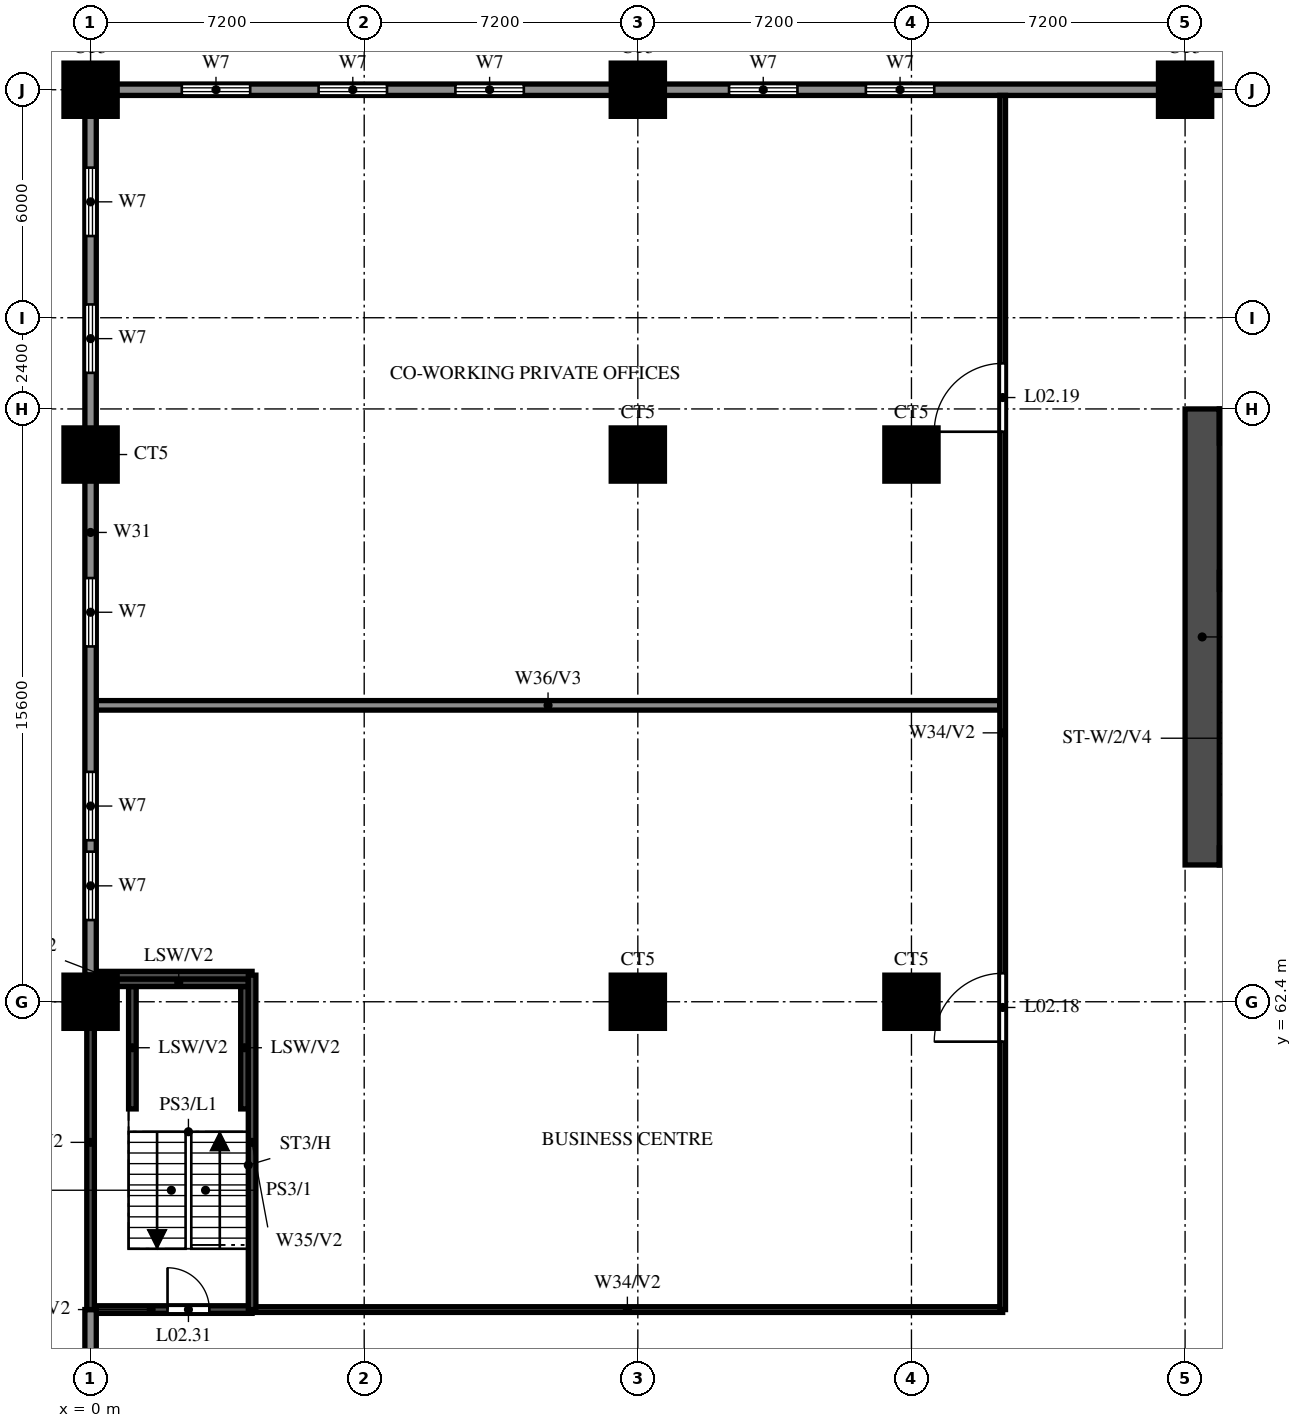
"""IFC4 building model, lengths in metres.
Left out: names, types, materials, properties, quantities, classifications, styles, units other than length and angle.
Written with IfcOpenShell. Run it as: python <this file> out.ifc"""

import sys

from ifc_helpers import new_model, si_unit, direction, frame, frame_2d, origin, origin_2d, place, context, subcontext, project, spatial, rectangle, circle, extrude, source, transform, mapped, element, fill, save


model = new_model("IFC4")
c1 = context("Model", 3, precision=1e-05, world=origin(), true_north=direction((0.0, 1.0)))
c2 = subcontext(c1, "Body", "Model", "MODEL_VIEW")
j1 = project(units=[si_unit("LENGTHUNIT", "METRE"), si_unit("PLANEANGLEUNIT", "RADIAN")], contexts=[c1])
p1 = place(None, origin())
s1 = spatial("IfcSite", under=j1, at=p1, CompositionType="ELEMENT")
p2 = place(p1, origin())
s2 = spatial("IfcBuilding", under=s1, at=p2, CompositionType="ELEMENT")
p3 = place(p2, frame((0.0, 0.0, 13.2)))
s3 = spatial("IfcBuildingStorey", under=s2, at=p3, CompositionType="ELEMENT", Elevation=13.2)
m1 = source(origin(), c2, "Body", "SweptSolid", [
    extrude(circle(Radius=0.7, at=origin_2d()), origin(), (0.0, 0.0, 1.0), 3.8),
])
for number, where, z_axis, x_axis in (
    (1, (0.0, 62.4, 0.0), (0.0, 0.0, 1.0), (1.0, 0.0, 0.0)),
    (2, (14.4, 62.4, 0.0), (0.0, 0.0, 1.0), (1.0, 0.0, 0.0)),
    (3, (21.6, 62.4, 0.0), (0.0, 0.0, 1.0), (1.0, 0.0, 0.0)),
    (4, (0.0, 76.8, 0.0), (0.0, 0.0, 1.0), (1.0, 0.0, 0.0)),
    (5, (14.4, 76.8, 0.0), (0.0, 0.0, 1.0), (1.0, 0.0, 0.0)),
    (6, (21.6, 76.8, 0.0), (0.0, 0.0, 1.0), (1.0, 0.0, 0.0)),
    (7, (0.0, 86.4, 0.0), (0.0, 0.0, 1.0), (1.0, 0.0, 0.0)),
    (8, (14.4, 86.4, 0.0), (0.0, 0.0, 1.0), (1.0, 0.0, 0.0)),
    (9, (28.8, 86.4, 0.0), (0.0, 0.0, 1.0), (1.0, 0.0, 0.0)),
):
    element("IfcColumn", number, at=place(p3, frame(where, z_axis=z_axis, x_axis=x_axis)), inside=s3, PredefinedType="COLUMN", context=c2, shape_type="MappedRepresentation", body=[
        mapped(m1, transform((0.0, 0.0, 0.0))),
    ])
p4 = place(p3, frame((29.25, 66.0, 0.0), z_axis=(0.0, 0.0, 1.0), x_axis=(0.0, 1.0, 0.0)))
e10 = element("IfcWall", 10, at=p4, inside=s3, PredefinedType="SHEAR", context=c2, shape_type="SweptSolid", body=[
    extrude(rectangle(XDim=12.0, YDim=0.9, at=frame_2d((6.0, 0.0))), origin(), (0.0, 0.0, 1.0), 3.8),
])
p5 = place(p3, frame((29.7, 77.55, 0.0), z_axis=(0.0, 0.0, 1.0), x_axis=(1.0, 0.0, 0.0)))
e11 = element("IfcWall", 11, at=p5, inside=s3, PredefinedType="SHEAR", context=c2, shape_type="SweptSolid", body=[
    extrude(rectangle(XDim=41.4, YDim=0.9, at=frame_2d((20.7, 0.0))), origin(), (0.0, 0.0, 1.0), 3.8),
])
p6 = place(p3, frame((29.7, 66.225, 0.0), z_axis=(0.0, 0.0, 1.0), x_axis=(1.0, 0.0, 0.0)))
e12 = element("IfcWall", 12, at=p6, inside=s3, PredefinedType="SHEAR", context=c2, shape_type="SweptSolid", body=[
    extrude(rectangle(XDim=41.4, YDim=0.45, at=frame_2d((20.7, 0.0))), origin(), (0.0, 0.0, 1.0), 3.8),
])
p7 = place(p6, frame((0.925, 0.0, 0.0)))
e13 = element("IfcOpeningElement", 13, at=p7, cuts=e12, PredefinedType="OPENING", context=c2, shape_type="SweptSolid", body=[
    extrude(rectangle(XDim=1.1, YDim=2.1, at=frame_2d((0.55, 1.05))), frame((0.0, 0.235, 0.0), z_axis=(0.0, -1.0, 0.0), x_axis=(1.0, 0.0, 0.0)), (0.0, 0.0, 1.0), 0.47),
])
p8 = place(p6, frame((3.738, 0.0, 0.0)))
e14 = element("IfcOpeningElement", 14, at=p8, cuts=e12, PredefinedType="OPENING", context=c2, shape_type="SweptSolid", body=[
    extrude(rectangle(XDim=1.8, YDim=2.1, at=frame_2d((0.9, 1.05))), frame((0.0, 0.235, 0.0), z_axis=(0.0, -1.0, 0.0), x_axis=(1.0, 0.0, 0.0)), (0.0, 0.0, 1.0), 0.47),
])
p9 = place(p3, frame((29.7, 73.475, 0.0), z_axis=(0.0, 0.0, 1.0), x_axis=(1.0, 0.0, 0.0)))
e15 = element("IfcWall", 15, at=p9, inside=s3, PredefinedType="SHEAR", context=c2, shape_type="SweptSolid", body=[
    extrude(rectangle(XDim=3.175, YDim=0.45, at=frame_2d((1.587, 0.0))), origin(), (0.0, 0.0, 1.0), 3.8),
])
for number, where, z_axis, x_axis in (
    (16, (1.1, 59.58, 0.0), (0.0, 0.0, 1.0), (0.0, 1.0, 0.0)),
    (17, (4.05, 59.58, 0.0), (0.0, 0.0, 1.0), (0.0, 1.0, 0.0)),
):
    element("IfcWall", number, at=place(p3, frame(where, z_axis=z_axis, x_axis=x_axis)), inside=s3, PredefinedType="SOLIDWALL", context=c2, shape_type="SweptSolid", body=[
        extrude(rectangle(XDim=3.22, YDim=0.2, at=frame_2d((1.61, 0.0))), origin(), (0.0, 0.0, 1.0), 1.9),
    ])
p10 = place(p3, frame((0.49, 62.9, 0.0), z_axis=(0.0, 0.0, 1.0), x_axis=(1.0, 0.0, 0.0)))
e18 = element("IfcWall", 18, at=p10, inside=s3, PredefinedType="SOLIDWALL", context=c2, shape_type="SweptSolid", body=[
    extrude(rectangle(XDim=3.66, YDim=0.2, at=frame_2d((1.83, 0.0))), origin(), (0.0, 0.0, 1.0), 1.9),
])
p11 = place(p3, frame((4.25, 54.3, 0.0), z_axis=(0.0, 0.0, 1.0), x_axis=(1.0, 0.0, 0.0)))
e19 = element("IfcWall", 19, at=p11, inside=s3, PredefinedType="PARTITIONING", context=c2, shape_type="SweptSolid", body=[
    extrude(rectangle(XDim=19.75, YDim=0.15, at=frame_2d((9.875, 0.0))), origin(), (0.0, 0.0, 1.0), 2.6),
])
p12 = place(p3, frame((0.0, 54.3, 0.0), z_axis=(0.0, 0.0, 1.0), x_axis=(1.0, 0.0, 0.0)))
e20 = element("IfcWall", 20, at=p12, inside=s3, PredefinedType="SOLIDWALL", context=c2, shape_type="SweptSolid", body=[
    extrude(rectangle(XDim=4.25, YDim=0.2, at=frame_2d((2.125, 0.0))), origin(), (0.0, 0.0, 1.0), 3.8),
])
p13 = place(p12, frame((2.025, 0.0, 0.0)))
e21 = element("IfcOpeningElement", 21, at=p13, cuts=e20, PredefinedType="OPENING", context=c2, shape_type="SweptSolid", body=[
    extrude(rectangle(XDim=1.1, YDim=2.1, at=frame_2d((0.55, 1.05))), frame((0.0, 0.11, 0.0), z_axis=(0.0, -1.0, 0.0), x_axis=(1.0, 0.0, 0.0)), (0.0, 0.0, 1.0), 0.22),
])
p14 = place(p3, frame((0.0, 63.1, 0.0), z_axis=(0.0, 0.0, 1.0), x_axis=(1.0, 0.0, 0.0)))
e22 = element("IfcWall", 22, at=p14, inside=s3, PredefinedType="SOLIDWALL", context=c2, shape_type="SweptSolid", body=[
    extrude(rectangle(XDim=4.25, YDim=0.2, at=frame_2d((2.125, 0.0))), origin(), (0.0, 0.0, 1.0), 3.8),
])
p15 = place(p3, frame((0.15, 70.2, 0.0), z_axis=(0.0, 0.0, 1.0), x_axis=(1.0, 0.0, 0.0)))
e23 = element("IfcWall", 23, at=p15, inside=s3, PredefinedType="SOLIDWALL", context=c2, shape_type="SweptSolid", body=[
    extrude(rectangle(XDim=23.775, YDim=0.25, at=frame_2d((11.888, 0.0))), origin(), (0.0, 0.0, 1.0), 2.6),
])
p16 = place(p3, frame((0.0, 86.4, 0.0), z_axis=(0.0, 0.0, 1.0), x_axis=(1.0, 0.0, 0.0)))
e24 = element("IfcWall", 24, at=p16, inside=s3, PredefinedType="SOLIDWALL", context=c2, shape_type="SweptSolid", body=[
    extrude(rectangle(XDim=100.8, YDim=0.3, at=frame_2d((50.4, 0.0))), origin(), (0.0, 0.0, 1.0), 3.8),
])
p17 = place(p16, frame((2.4, 0.0, 0.6)))
e25 = element("IfcOpeningElement", 25, at=p17, cuts=e24, PredefinedType="OPENING", context=c2, shape_type="SweptSolid", body=[
    extrude(rectangle(XDim=1.8, YDim=2.4, at=frame_2d((0.9, 1.2))), frame((0.0, 0.16, 0.0), z_axis=(0.0, -1.0, 0.0), x_axis=(1.0, 0.0, 0.0)), (0.0, 0.0, 1.0), 0.32),
])
p18 = place(p16, frame((6.0, 0.0, 0.6)))
e26 = element("IfcOpeningElement", 26, at=p18, cuts=e24, PredefinedType="OPENING", context=c2, shape_type="SweptSolid", body=[
    extrude(rectangle(XDim=1.8, YDim=2.4, at=frame_2d((0.9, 1.2))), frame((0.0, 0.16, 0.0), z_axis=(0.0, -1.0, 0.0), x_axis=(1.0, 0.0, 0.0)), (0.0, 0.0, 1.0), 0.32),
])
p19 = place(p16, frame((9.6, 0.0, 0.6)))
e27 = element("IfcOpeningElement", 27, at=p19, cuts=e24, PredefinedType="OPENING", context=c2, shape_type="SweptSolid", body=[
    extrude(rectangle(XDim=1.8, YDim=2.4, at=frame_2d((0.9, 1.2))), frame((0.0, 0.16, 0.0), z_axis=(0.0, -1.0, 0.0), x_axis=(1.0, 0.0, 0.0)), (0.0, 0.0, 1.0), 0.32),
])
p20 = place(p16, frame((16.8, 0.0, 0.6)))
e28 = element("IfcOpeningElement", 28, at=p20, cuts=e24, PredefinedType="OPENING", context=c2, shape_type="SweptSolid", body=[
    extrude(rectangle(XDim=1.8, YDim=2.4, at=frame_2d((0.9, 1.2))), frame((0.0, 0.16, 0.0), z_axis=(0.0, -1.0, 0.0), x_axis=(1.0, 0.0, 0.0)), (0.0, 0.0, 1.0), 0.32),
])
p21 = place(p16, frame((20.4, 0.0, 0.6)))
e29 = element("IfcOpeningElement", 29, at=p21, cuts=e24, PredefinedType="OPENING", context=c2, shape_type="SweptSolid", body=[
    extrude(rectangle(XDim=1.8, YDim=2.4, at=frame_2d((0.9, 1.2))), frame((0.0, 0.16, 0.0), z_axis=(0.0, -1.0, 0.0), x_axis=(1.0, 0.0, 0.0)), (0.0, 0.0, 1.0), 0.32),
])
p22 = place(p16, frame((78.0, 0.0, 0.6)))
e30 = element("IfcOpeningElement", 30, at=p22, cuts=e24, PredefinedType="OPENING", context=c2, shape_type="SweptSolid", body=[
    extrude(rectangle(XDim=1.8, YDim=2.4, at=frame_2d((0.9, 1.2))), frame((0.0, 0.16, 0.0), z_axis=(0.0, -1.0, 0.0), x_axis=(1.0, 0.0, 0.0)), (0.0, 0.0, 1.0), 0.32),
])
p23 = place(p16, frame((81.6, 0.0, 0.6)))
e31 = element("IfcOpeningElement", 31, at=p23, cuts=e24, PredefinedType="OPENING", context=c2, shape_type="SweptSolid", body=[
    extrude(rectangle(XDim=1.8, YDim=2.4, at=frame_2d((0.9, 1.2))), frame((0.0, 0.16, 0.0), z_axis=(0.0, -1.0, 0.0), x_axis=(1.0, 0.0, 0.0)), (0.0, 0.0, 1.0), 0.32),
])
p24 = place(p16, frame((88.8, 0.0, 0.6)))
e32 = element("IfcOpeningElement", 32, at=p24, cuts=e24, PredefinedType="OPENING", context=c2, shape_type="SweptSolid", body=[
    extrude(rectangle(XDim=1.8, YDim=2.4, at=frame_2d((0.9, 1.2))), frame((0.0, 0.16, 0.0), z_axis=(0.0, -1.0, 0.0), x_axis=(1.0, 0.0, 0.0)), (0.0, 0.0, 1.0), 0.32),
])
p25 = place(p16, frame((92.4, 0.0, 0.6)))
e33 = element("IfcOpeningElement", 33, at=p25, cuts=e24, PredefinedType="OPENING", context=c2, shape_type="SweptSolid", body=[
    extrude(rectangle(XDim=1.8, YDim=2.4, at=frame_2d((0.9, 1.2))), frame((0.0, 0.16, 0.0), z_axis=(0.0, -1.0, 0.0), x_axis=(1.0, 0.0, 0.0)), (0.0, 0.0, 1.0), 0.32),
])
p26 = place(p16, frame((96.0, 0.0, 0.6)))
e34 = element("IfcOpeningElement", 34, at=p26, cuts=e24, PredefinedType="OPENING", context=c2, shape_type="SweptSolid", body=[
    extrude(rectangle(XDim=1.8, YDim=2.4, at=frame_2d((0.9, 1.2))), frame((0.0, 0.16, 0.0), z_axis=(0.0, -1.0, 0.0), x_axis=(1.0, 0.0, 0.0)), (0.0, 0.0, 1.0), 0.32),
])
p27 = place(p3, frame((0.0, 51.1, 0.0), z_axis=(0.0, 0.0, 1.0), x_axis=(0.0, 1.0, 0.0)))
e35 = element("IfcWall", 35, at=p27, inside=s3, PredefinedType="SOLIDWALL", context=c2, shape_type="SweptSolid", body=[
    extrude(rectangle(XDim=3.2, YDim=0.3, at=frame_2d((1.6, 0.0))), origin(), (0.0, 0.0, 1.0), 3.8),
])
p28 = place(p3, frame((0.0, 63.1, 0.0), z_axis=(0.0, 0.0, 1.0), x_axis=(0.0, 1.0, 0.0)))
e36 = element("IfcWall", 36, at=p28, inside=s3, PredefinedType="SOLIDWALL", context=c2, shape_type="SweptSolid", body=[
    extrude(rectangle(XDim=23.3, YDim=0.3, at=frame_2d((11.65, 0.0))), origin(), (0.0, 0.0, 1.0), 3.8),
])
p29 = place(p28, frame((1.45, 0.0, 0.6)))
e37 = element("IfcOpeningElement", 37, at=p29, cuts=e36, PredefinedType="OPENING", context=c2, shape_type="SweptSolid", body=[
    extrude(rectangle(XDim=1.8, YDim=2.4, at=frame_2d((0.9, 1.2))), frame((0.0, 0.16, 0.0), z_axis=(0.0, -1.0, 0.0), x_axis=(1.0, 0.0, 0.0)), (0.0, 0.0, 1.0), 0.32),
])
p30 = place(p28, frame((3.55, 0.0, 0.6)))
e38 = element("IfcOpeningElement", 38, at=p30, cuts=e36, PredefinedType="OPENING", context=c2, shape_type="SweptSolid", body=[
    extrude(rectangle(XDim=1.8, YDim=2.4, at=frame_2d((0.9, 1.2))), frame((0.0, 0.16, 0.0), z_axis=(0.0, -1.0, 0.0), x_axis=(1.0, 0.0, 0.0)), (0.0, 0.0, 1.0), 0.32),
])
p31 = place(p28, frame((8.65, 0.0, 0.6)))
e39 = element("IfcOpeningElement", 39, at=p31, cuts=e36, PredefinedType="OPENING", context=c2, shape_type="SweptSolid", body=[
    extrude(rectangle(XDim=1.8, YDim=2.4, at=frame_2d((0.9, 1.2))), frame((0.0, 0.16, 0.0), z_axis=(0.0, -1.0, 0.0), x_axis=(1.0, 0.0, 0.0)), (0.0, 0.0, 1.0), 0.32),
])
p32 = place(p28, frame((15.85, 0.0, 0.6)))
e40 = element("IfcOpeningElement", 40, at=p32, cuts=e36, PredefinedType="OPENING", context=c2, shape_type="SweptSolid", body=[
    extrude(rectangle(XDim=1.8, YDim=2.4, at=frame_2d((0.9, 1.2))), frame((0.0, 0.16, 0.0), z_axis=(0.0, -1.0, 0.0), x_axis=(1.0, 0.0, 0.0)), (0.0, 0.0, 1.0), 0.32),
])
p33 = place(p28, frame((19.45, 0.0, 0.6)))
e41 = element("IfcOpeningElement", 41, at=p33, cuts=e36, PredefinedType="OPENING", context=c2, shape_type="SweptSolid", body=[
    extrude(rectangle(XDim=1.8, YDim=2.4, at=frame_2d((0.9, 1.2))), frame((0.0, 0.16, 0.0), z_axis=(0.0, -1.0, 0.0), x_axis=(1.0, 0.0, 0.0)), (0.0, 0.0, 1.0), 0.32),
])
for number, where, z_axis, x_axis in (
    (42, (0.0, 54.3, 0.0), (0.0, 0.0, 1.0), (0.0, 1.0, 0.0)),
    (43, (4.25, 54.3, 0.0), (0.0, 0.0, 1.0), (0.0, 1.0, 0.0)),
):
    element("IfcWall", number, at=place(p3, frame(where, z_axis=z_axis, x_axis=x_axis)), inside=s3, PredefinedType="SOLIDWALL", context=c2, shape_type="SweptSolid", body=[
        extrude(rectangle(XDim=8.8, YDim=0.2, at=frame_2d((4.4, 0.0))), origin(), (0.0, 0.0, 1.0), 3.8),
    ])
p34 = place(p3, frame((24.0, 54.3, 0.0), z_axis=(0.0, 0.0, 1.0), x_axis=(0.0, 1.0, 0.0)))
e44 = element("IfcWall", 44, at=p34, inside=s3, PredefinedType="PARTITIONING", context=c2, shape_type="SweptSolid", body=[
    extrude(rectangle(XDim=31.95, YDim=0.15, at=frame_2d((15.975, 0.0))), origin(), (0.0, 0.0, 1.0), 2.6),
])
p35 = place(p34, frame((7.05, 0.0, 0.0)))
e45 = element("IfcOpeningElement", 45, at=p35, cuts=e44, PredefinedType="OPENING", context=c2, shape_type="SweptSolid", body=[
    extrude(rectangle(XDim=1.8, YDim=2.1, at=frame_2d((0.9, 1.05))), frame((0.0, 0.085, 0.0), z_axis=(0.0, -1.0, 0.0), x_axis=(1.0, 0.0, 0.0)), (0.0, 0.0, 1.0), 0.17),
])
p36 = place(p34, frame((23.1, 0.0, 0.0)))
e46 = element("IfcOpeningElement", 46, at=p36, cuts=e44, PredefinedType="OPENING", context=c2, shape_type="SweptSolid", body=[
    extrude(rectangle(XDim=1.8, YDim=2.1, at=frame_2d((0.9, 1.05))), frame((0.0, 0.085, 0.0), z_axis=(0.0, -1.0, 0.0), x_axis=(1.0, 0.0, 0.0)), (0.0, 0.0, 1.0), 0.17),
])
p37 = place(p35, origin())
e47 = element("IfcDoor", 47, at=p37, inside=s3, OperationType="DOUBLE_DOOR_SINGLE_SWING", PredefinedType="DOOR", context=c2, shape_type="SweptSolid", body=[
    extrude(rectangle(XDim=1.8, YDim=2.1, at=frame_2d((0.9, 1.05))), frame((0.0, 0.025, 0.0), z_axis=(0.0, -1.0, 0.0), x_axis=(1.0, 0.0, 0.0)), (0.0, 0.0, 1.0), 0.05),
])
fill(e45, e47)
p38 = place(p36, origin())
e48 = element("IfcDoor", 48, at=p38, inside=s3, OperationType="DOUBLE_DOOR_SINGLE_SWING", PredefinedType="DOOR", context=c2, shape_type="SweptSolid", body=[
    extrude(rectangle(XDim=1.8, YDim=2.1, at=frame_2d((0.9, 1.05))), frame((0.0, 0.025, 0.0), z_axis=(0.0, -1.0, 0.0), x_axis=(1.0, 0.0, 0.0)), (0.0, 0.0, 1.0), 0.05),
])
fill(e46, e48)
p39 = place(p13, origin())
e49 = element("IfcDoor", 49, at=p39, inside=s3, OperationType="SINGLE_SWING_RIGHT", PredefinedType="DOOR", context=c2, shape_type="SweptSolid", body=[
    extrude(rectangle(XDim=1.1, YDim=2.1, at=frame_2d((0.55, 1.05))), frame((0.0, 0.025, 0.0), z_axis=(0.0, -1.0, 0.0), x_axis=(1.0, 0.0, 0.0)), (0.0, 0.0, 1.0), 0.05),
])
fill(e21, e49)
p40 = place(p17, origin())
e50 = element("IfcWindow", 50, at=p40, inside=s3, PartitioningType="DOUBLE_PANEL_VERTICAL", PredefinedType="WINDOW", context=c2, shape_type="SweptSolid", body=[
    extrude(rectangle(XDim=1.8, YDim=2.4, at=frame_2d((0.9, 1.2))), frame((0.0, 0.03, 0.0), z_axis=(0.0, -1.0, 0.0), x_axis=(1.0, 0.0, 0.0)), (0.0, 0.0, 1.0), 0.06),
])
fill(e25, e50)
p41 = place(p18, origin())
e51 = element("IfcWindow", 51, at=p41, inside=s3, PartitioningType="DOUBLE_PANEL_VERTICAL", PredefinedType="WINDOW", context=c2, shape_type="SweptSolid", body=[
    extrude(rectangle(XDim=1.8, YDim=2.4, at=frame_2d((0.9, 1.2))), frame((0.0, 0.03, 0.0), z_axis=(0.0, -1.0, 0.0), x_axis=(1.0, 0.0, 0.0)), (0.0, 0.0, 1.0), 0.06),
])
fill(e26, e51)
p42 = place(p19, origin())
e52 = element("IfcWindow", 52, at=p42, inside=s3, PartitioningType="DOUBLE_PANEL_VERTICAL", PredefinedType="WINDOW", context=c2, shape_type="SweptSolid", body=[
    extrude(rectangle(XDim=1.8, YDim=2.4, at=frame_2d((0.9, 1.2))), frame((0.0, 0.03, 0.0), z_axis=(0.0, -1.0, 0.0), x_axis=(1.0, 0.0, 0.0)), (0.0, 0.0, 1.0), 0.06),
])
fill(e27, e52)
p43 = place(p20, origin())
e53 = element("IfcWindow", 53, at=p43, inside=s3, PartitioningType="DOUBLE_PANEL_VERTICAL", PredefinedType="WINDOW", context=c2, shape_type="SweptSolid", body=[
    extrude(rectangle(XDim=1.8, YDim=2.4, at=frame_2d((0.9, 1.2))), frame((0.0, 0.03, 0.0), z_axis=(0.0, -1.0, 0.0), x_axis=(1.0, 0.0, 0.0)), (0.0, 0.0, 1.0), 0.06),
])
fill(e28, e53)
p44 = place(p21, origin())
e54 = element("IfcWindow", 54, at=p44, inside=s3, PartitioningType="DOUBLE_PANEL_VERTICAL", PredefinedType="WINDOW", context=c2, shape_type="SweptSolid", body=[
    extrude(rectangle(XDim=1.8, YDim=2.4, at=frame_2d((0.9, 1.2))), frame((0.0, 0.03, 0.0), z_axis=(0.0, -1.0, 0.0), x_axis=(1.0, 0.0, 0.0)), (0.0, 0.0, 1.0), 0.06),
])
fill(e29, e54)
p45 = place(p29, origin())
e55 = element("IfcWindow", 55, at=p45, inside=s3, PartitioningType="DOUBLE_PANEL_VERTICAL", PredefinedType="WINDOW", context=c2, shape_type="SweptSolid", body=[
    extrude(rectangle(XDim=1.8, YDim=2.4, at=frame_2d((0.9, 1.2))), frame((0.0, 0.03, 0.0), z_axis=(0.0, -1.0, 0.0), x_axis=(1.0, 0.0, 0.0)), (0.0, 0.0, 1.0), 0.06),
])
fill(e37, e55)
p46 = place(p30, origin())
e56 = element("IfcWindow", 56, at=p46, inside=s3, PartitioningType="DOUBLE_PANEL_VERTICAL", PredefinedType="WINDOW", context=c2, shape_type="SweptSolid", body=[
    extrude(rectangle(XDim=1.8, YDim=2.4, at=frame_2d((0.9, 1.2))), frame((0.0, 0.03, 0.0), z_axis=(0.0, -1.0, 0.0), x_axis=(1.0, 0.0, 0.0)), (0.0, 0.0, 1.0), 0.06),
])
fill(e38, e56)
p47 = place(p31, origin())
e57 = element("IfcWindow", 57, at=p47, inside=s3, PartitioningType="DOUBLE_PANEL_VERTICAL", PredefinedType="WINDOW", context=c2, shape_type="SweptSolid", body=[
    extrude(rectangle(XDim=1.8, YDim=2.4, at=frame_2d((0.9, 1.2))), frame((0.0, 0.03, 0.0), z_axis=(0.0, -1.0, 0.0), x_axis=(1.0, 0.0, 0.0)), (0.0, 0.0, 1.0), 0.06),
])
fill(e39, e57)
p48 = place(p32, origin())
e58 = element("IfcWindow", 58, at=p48, inside=s3, PartitioningType="DOUBLE_PANEL_VERTICAL", PredefinedType="WINDOW", context=c2, shape_type="SweptSolid", body=[
    extrude(rectangle(XDim=1.8, YDim=2.4, at=frame_2d((0.9, 1.2))), frame((0.0, 0.03, 0.0), z_axis=(0.0, -1.0, 0.0), x_axis=(1.0, 0.0, 0.0)), (0.0, 0.0, 1.0), 0.06),
])
fill(e40, e58)
p49 = place(p33, origin())
e59 = element("IfcWindow", 59, at=p49, inside=s3, PartitioningType="DOUBLE_PANEL_VERTICAL", PredefinedType="WINDOW", context=c2, shape_type="SweptSolid", body=[
    extrude(rectangle(XDim=1.8, YDim=2.4, at=frame_2d((0.9, 1.2))), frame((0.0, 0.03, 0.0), z_axis=(0.0, -1.0, 0.0), x_axis=(1.0, 0.0, 0.0)), (0.0, 0.0, 1.0), 0.06),
])
fill(e41, e59)
save(model, sys.argv[1])
